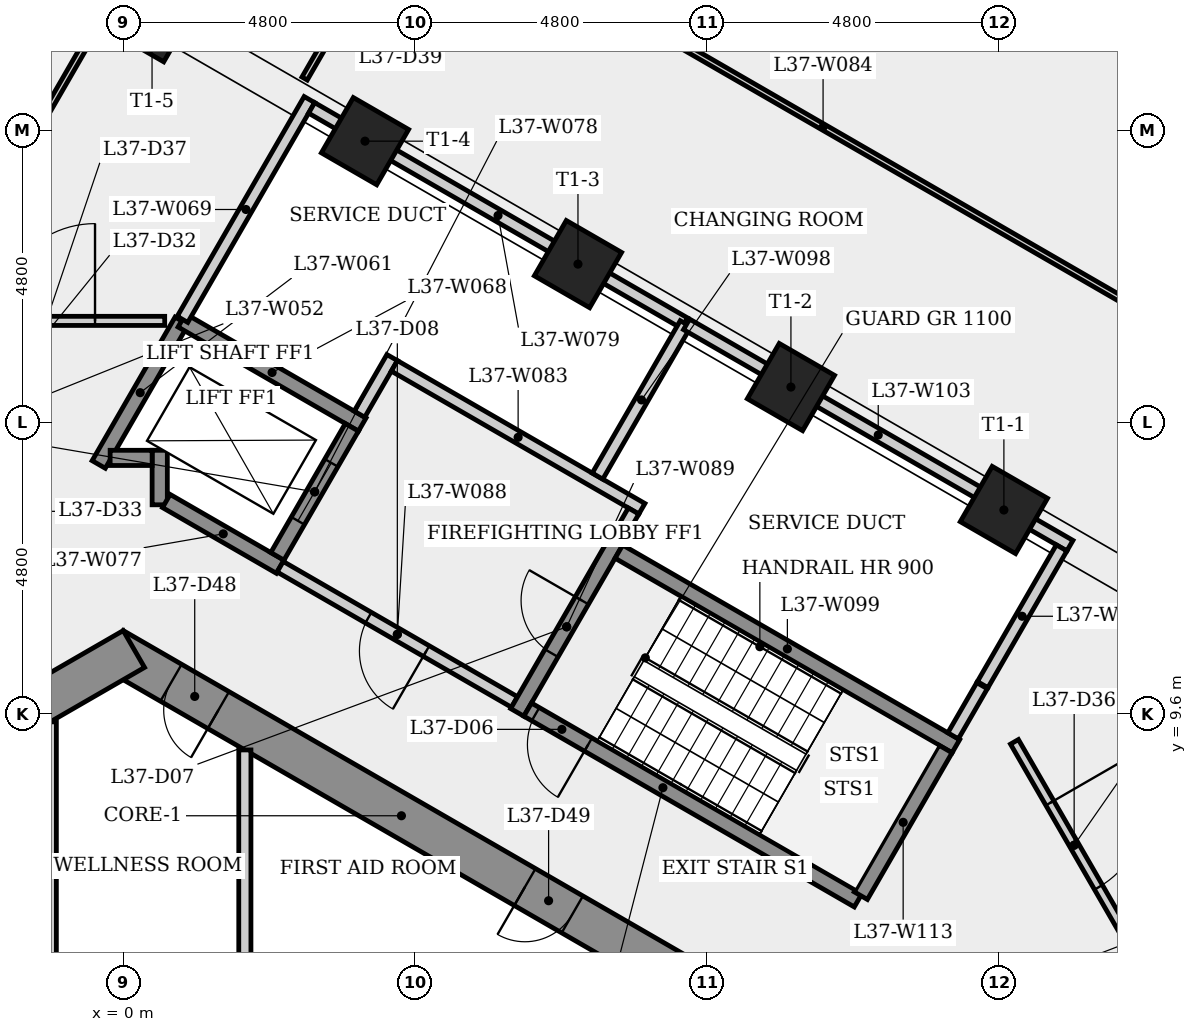
"""IFC4 building model, lengths in metres.
Left out: names, types, materials, properties, quantities, classifications, styles, units other than length and angle.
Written with IfcOpenShell. Run it as: python <this file> out.ifc"""

import sys

from ifc_helpers import new_model, si_unit, direction, frame, frame_2d, origin, origin_2d, place, context, subcontext, project, spatial, rectangle, extrude, element, fill, save


model = new_model("IFC4")
c1 = context("Model", 3, precision=1e-05, world=origin(), true_north=direction((0.0, 1.0)))
c2 = subcontext(c1, "Body", "Model", "MODEL_VIEW")
j1 = project(units=[si_unit("LENGTHUNIT", "METRE"), si_unit("PLANEANGLEUNIT", "RADIAN")], contexts=[c1])
p1 = place(None, origin())
s1 = spatial("IfcSite", under=j1, at=p1, CompositionType="ELEMENT")
p2 = place(p1, origin())
s2 = spatial("IfcBuilding", under=s1, at=p2, CompositionType="ELEMENT")
p3 = place(p2, frame((0.0, 0.0, 139.9)))
s3 = spatial("IfcBuildingStorey", under=s2, at=p3, CompositionType="ELEMENT", Elevation=139.9)
p4 = place(p3, frame((9.325, 5.182, 0.0), z_axis=(0.0, 0.0, 1.0), x_axis=(-0.866023993627, 0.500002442456, 0.0)))
e1 = element("IfcWall", 1, at=p4, inside=s3, PredefinedType="SHEAR", context=c2, shape_type="SweptSolid", body=[
    extrude(rectangle(XDim=10.97, YDim=0.7, at=frame_2d((5.485, 0.0))), origin(), (0.0, 0.0, 1.0), 4.0),
])
p5 = place(p4, frame((8.96, 0.0, 0.0)))
e2 = element("IfcOpeningElement", 2, at=p5, cuts=e1, PredefinedType="OPENING", context=c2, shape_type="SweptSolid", body=[
    extrude(rectangle(XDim=0.9, YDim=2.1, at=frame_2d((0.45, 1.05))), frame((0.0, 0.36, 0.0), z_axis=(0.0, -1.0, 0.0), x_axis=(1.0, 0.0, 0.0)), (0.0, 0.0, 1.0), 0.72),
])
p6 = place(p4, frame((2.24, 0.0, 0.0)))
e3 = element("IfcOpeningElement", 3, at=p6, cuts=e1, PredefinedType="OPENING", context=c2, shape_type="SweptSolid", body=[
    extrude(rectangle(XDim=0.9, YDim=2.1, at=frame_2d((0.45, 1.05))), frame((0.0, 0.36, 0.0), z_axis=(0.0, -1.0, 0.0), x_axis=(1.0, 0.0, 0.0)), (0.0, 0.0, 1.0), 0.72),
])
p7 = place(p3, frame((0.175, 10.667, 0.0), z_axis=(0.0, 0.0, 1.0), x_axis=(-0.866023993627, -0.500002442456, 0.0)))
e4 = element("IfcWall", 4, at=p7, inside=s3, PredefinedType="SHEAR", context=c2, shape_type="SweptSolid", body=[
    extrude(rectangle(XDim=10.97, YDim=0.7, at=frame_2d((5.485, 0.0))), origin(), (0.0, 0.0, 1.0), 4.0),
])
p8 = place(p7, frame((7.368, 0.0, 0.0)))
e5 = element("IfcOpeningElement", 5, at=p8, cuts=e4, PredefinedType="OPENING", context=c2, shape_type="SweptSolid", body=[
    extrude(rectangle(XDim=0.9, YDim=2.1, at=frame_2d((0.45, 1.05))), frame((0.0, 0.36, 0.0), z_axis=(0.0, -1.0, 0.0), x_axis=(1.0, 0.0, 0.0)), (0.0, 0.0, 1.0), 0.72),
])
for number, where, z_axis, x_axis in (
    (6, (14.483, 12.953, 0.0), (0.0, 0.0, 1.0), (0.5, 0.866, 0.0)),
    (7, (10.981, 14.975, 0.0), (0.0, 0.0, 1.0), (0.5, 0.866, 0.0)),
    (8, (7.479, 16.997, 0.0), (0.0, 0.0, 1.0), (0.5, 0.866, 0.0)),
    (9, (3.976, 19.019, 0.0), (0.0, 0.0, 1.0), (0.5, 0.866, 0.0)),
    (10, (0.474, 21.042, 0.0), (0.0, 0.0, 1.0), (0.5, 0.866, 0.0)),
):
    element("IfcColumn", number, at=place(p3, frame(where, z_axis=z_axis, x_axis=x_axis)), inside=s3, PredefinedType="COLUMN", context=c2, shape_type="SweptSolid", body=[
        extrude(rectangle(XDim=1.05, YDim=1.05, at=origin_2d()), origin(), (0.0, 0.0, 1.0), 4.0),
    ])
p9 = place(p3, frame((-3.548, 16.063, 0.0), z_axis=(0.0, 0.0, 1.0), x_axis=(1.0, 0.0, 0.0)))
e11 = element("IfcWall", 11, at=p9, inside=s3, PredefinedType="PARTITIONING", context=c2, shape_type="SweptSolid", body=[
    extrude(rectangle(XDim=4.23, YDim=0.15, at=frame_2d((2.115, 0.0))), origin(), (0.0, 0.0, 1.0), 3.6),
])
p10 = place(p9, frame((1.484, 0.0, 0.0)))
e12 = element("IfcOpeningElement", 12, at=p10, cuts=e11, PredefinedType="OPENING", context=c2, shape_type="SweptSolid", body=[
    extrude(rectangle(XDim=1.6, YDim=2.1, at=frame_2d((0.8, 1.05))), frame((0.0, 0.085, 0.0), z_axis=(0.0, -1.0, 0.0), x_axis=(1.0, 0.0, 0.0)), (0.0, 0.0, 1.0), 0.17),
])
p11 = place(p3, frame((-3.207, 16.128, 0.0), z_axis=(0.0, 0.0, 1.0), x_axis=(0.499964049572, 0.866046158779, 0.0)))
e13 = element("IfcWall", 13, at=p11, inside=s3, PredefinedType="PARTITIONING", context=c2, shape_type="SweptSolid", body=[
    extrude(rectangle(XDim=5.773, YDim=0.1, at=frame_2d((2.887, 0.0))), origin(), (0.0, 0.0, 1.0), 3.6),
])
p12 = place(p11, frame((2.387, 0.0, 0.0)))
e14 = element("IfcOpeningElement", 14, at=p12, cuts=e13, PredefinedType="OPENING", context=c2, shape_type="SweptSolid", body=[
    extrude(rectangle(XDim=1.0, YDim=2.1, at=frame_2d((0.5, 1.05))), frame((0.0, 0.06, 0.0), z_axis=(0.0, -1.0, 0.0), x_axis=(1.0, 0.0, 0.0)), (0.0, 0.0, 1.0), 0.12),
])
p13 = place(p3, frame((-1.2, 9.469, 0.0), z_axis=(0.0, 0.0, 1.0), x_axis=(0.0, -1.0, 0.0)))
e15 = element("IfcWall", 15, at=p13, inside=s3, PredefinedType="PARTITIONING", context=c2, shape_type="SweptSolid", body=[
    extrude(rectangle(XDim=4.194, YDim=0.2, at=frame_2d((2.097, 0.0))), origin(), (0.0, 0.0, 1.0), 3.6),
])
p14 = place(p3, frame((-0.403, 13.702, 0.0), z_axis=(0.0, 0.0, 1.0), x_axis=(0.499942002849, 0.866058885866, 0.0)))
e16 = element("IfcWall", 16, at=p14, inside=s3, PredefinedType="SHEAR", context=c2, shape_type="SweptSolid", body=[
    extrude(rectangle(XDim=2.727, YDim=0.25, at=frame_2d((1.364, 0.0))), origin(), (0.0, 0.0, 1.0), 3.6),
])
p15 = place(p3, frame((0.6, 13.039, 0.0), z_axis=(0.0, 0.0, 1.0), x_axis=(0.0, 1.0, 0.0)))
e17 = element("IfcWall", 17, at=p15, inside=s3, PredefinedType="SHEAR", context=c2, shape_type="SweptSolid", body=[
    extrude(rectangle(XDim=0.896, YDim=0.25, at=frame_2d((0.448, 0.0))), origin(), (0.0, 0.0, 1.0), 3.6),
])
p16 = place(p3, frame((0.475, 13.81, 0.0), z_axis=(0.0, 0.0, 1.0), x_axis=(-1.0, 0.0, 0.0)))
e18 = element("IfcWall", 18, at=p16, inside=s3, PredefinedType="SHEAR", context=c2, shape_type="SweptSolid", body=[
    extrude(rectangle(XDim=0.691, YDim=0.25, at=frame_2d((0.345, 0.0))), origin(), (0.0, 0.0, 1.0), 4.0),
])
p17 = place(p3, frame((0.965, 16.071, 0.0), z_axis=(0.0, 0.0, 1.0), x_axis=(0.866050272892, -0.499956922968, 0.0)))
e19 = element("IfcWall", 19, at=p17, inside=s3, PredefinedType="SHEAR", context=c2, shape_type="SweptSolid", body=[
    extrude(rectangle(XDim=3.425, YDim=0.25, at=frame_2d((1.712, 0.0))), origin(), (0.0, 0.0, 1.0), 3.6),
])
p18 = place(p3, frame((0.975, 16.088, 0.0), z_axis=(0.0, 0.0, 1.0), x_axis=(0.500032984372, 0.866006359411, 0.0)))
e20 = element("IfcWall", 20, at=p18, inside=s3, PredefinedType="PLUMBINGWALL", context=c2, shape_type="SweptSolid", body=[
    extrude(rectangle(XDim=4.174, YDim=0.2, at=frame_2d((2.087, 0.0))), origin(), (0.0, 0.0, 1.0), 3.6),
])
p19 = place(p3, frame((2.0, 9.007, 0.0), z_axis=(0.0, 0.0, 1.0), x_axis=(0.0, -1.0, 0.0)))
e21 = element("IfcWall", 21, at=p19, inside=s3, PredefinedType="PARTITIONING", context=c2, shape_type="SweptSolid", body=[
    extrude(rectangle(XDim=3.732, YDim=0.2, at=frame_2d((1.866, 0.0))), origin(), (0.0, 0.0, 1.0), 3.6),
])
p20 = place(p3, frame((2.581, 12.02, 0.0), z_axis=(0.0, 0.0, 1.0), x_axis=(-0.86603892542, 0.499976579108, 0.0)))
e22 = element("IfcWall", 22, at=p20, inside=s3, PredefinedType="SHEAR", context=c2, shape_type="SweptSolid", body=[
    extrude(rectangle(XDim=2.162, YDim=0.25, at=frame_2d((1.081, 0.0))), origin(), (0.0, 0.0, 1.0), 3.6),
])
p21 = place(p3, frame((2.535, 12.191, 0.0), z_axis=(0.0, 0.0, 1.0), x_axis=(0.500061746146, 0.865989751695, 0.0)))
e23 = element("IfcWall", 23, at=p21, inside=s3, PredefinedType="SHEAR", context=c2, shape_type="SweptSolid", body=[
    extrude(rectangle(XDim=2.45, YDim=0.25, at=frame_2d((1.225, 0.0))), origin(), (0.0, 0.0, 1.0), 4.0),
])
p22 = place(p21, frame((0.675, 0.0, 0.0)))
e24 = element("IfcOpeningElement", 24, at=p22, cuts=e23, PredefinedType="OPENING", context=c2, shape_type="SweptSolid", body=[
    extrude(rectangle(XDim=1.1, YDim=2.1, at=frame_2d((0.55, 1.05))), frame((0.0, 0.135, 0.0), z_axis=(0.0, -1.0, 0.0), x_axis=(1.0, 0.0, 0.0)), (0.0, 0.0, 1.0), 0.27),
])
p23 = place(p3, frame((3.098, 19.566, 0.0), z_axis=(0.0, 0.0, 1.0), x_axis=(0.866019052629, -0.500011000363, 0.0)))
e25 = element("IfcWall", 25, at=p23, inside=s3, PredefinedType="PLUMBINGWALL", context=c2, shape_type="SweptSolid", body=[
    extrude(rectangle(XDim=7.08, YDim=0.2, at=frame_2d((3.54, 0.0))), origin(), (0.0, 0.0, 1.0), 2.725),
])
p24 = place(p3, frame((3.885, 14.529, 0.0), z_axis=(0.0, 0.0, 1.0), x_axis=(0.499997628298, 0.866026773083, 0.0)))
e26 = element("IfcWall", 26, at=p24, inside=s3, PredefinedType="PLUMBINGWALL", context=c2, shape_type="SweptSolid", body=[
    extrude(rectangle(XDim=1.075, YDim=0.2, at=frame_2d((0.538, 0.0))), origin(), (0.0, 0.0, 1.0), 3.6),
])
p25 = place(p3, frame((4.459, 15.323, 0.0), z_axis=(0.0, 0.0, 1.0), x_axis=(0.866016039709, -0.500016218704, 0.0)))
e27 = element("IfcWall", 27, at=p25, inside=s3, PredefinedType="PLUMBINGWALL", context=c2, shape_type="SweptSolid", body=[
    extrude(rectangle(XDim=4.7, YDim=0.2, at=frame_2d((2.35, 0.0))), origin(), (0.0, 0.0, 1.0), 3.6),
])
p26 = place(p3, frame((4.813, 23.119, 0.0), z_axis=(0.0, 0.0, 1.0), x_axis=(0.86602732511, -0.499996672152, 0.0)))
e28 = element("IfcWall", 28, at=p26, inside=s3, PredefinedType="PARTITIONING", context=c2, shape_type="SweptSolid", body=[
    extrude(rectangle(XDim=15.465, YDim=0.1, at=frame_2d((7.732, 0.0))), origin(), (0.0, 0.0, 1.0), 3.6),
])
p27 = place(p3, frame((2.983, 20.049, 0.0), z_axis=(0.0, 0.0, 1.0), x_axis=(0.499998345156, 0.866026359207, 0.0)))
e29 = element("IfcWall", 29, at=p27, inside=s3, PredefinedType="PARTITIONING", context=c2, shape_type="SweptSolid", body=[
    extrude(rectangle(XDim=15.805, YDim=0.1, at=frame_2d((7.903, 0.0))), origin(), (0.0, 0.0, 1.0), 3.6),
])
p28 = place(p27, frame((1.322, 0.0, 0.0)))
e30 = element("IfcOpeningElement", 30, at=p28, cuts=e29, PredefinedType="OPENING", context=c2, shape_type="SweptSolid", body=[
    extrude(rectangle(XDim=0.9, YDim=2.1, at=frame_2d((0.45, 1.05))), frame((0.0, 0.06, 0.0), z_axis=(0.0, -1.0, 0.0), x_axis=(1.0, 0.0, 0.0)), (0.0, 0.0, 1.0), 0.12),
])
p29 = place(p27, frame((8.325, 0.0, 0.0)))
e31 = element("IfcOpeningElement", 31, at=p29, cuts=e29, PredefinedType="OPENING", context=c2, shape_type="SweptSolid", body=[
    extrude(rectangle(XDim=1.6, YDim=2.1, at=frame_2d((0.8, 1.05))), frame((0.0, 0.06, 0.0), z_axis=(0.0, -1.0, 0.0), x_axis=(1.0, 0.0, 0.0)), (0.0, 0.0, 1.0), 0.12),
])
p30 = place(p3, frame((6.435, 9.795, 0.0), z_axis=(0.0, 0.0, 1.0), x_axis=(-0.866012907634, 0.500021643343, 0.0)))
e32 = element("IfcWall", 32, at=p30, inside=s3, PredefinedType="PARTITIONING", context=c2, shape_type="SweptSolid", body=[
    extrude(rectangle(XDim=4.45, YDim=0.2, at=frame_2d((2.225, 0.0))), origin(), (0.0, 0.0, 1.0), 3.6),
])
p31 = place(p30, frame((1.675, 0.0, 0.0)))
e33 = element("IfcOpeningElement", 33, at=p31, cuts=e32, PredefinedType="OPENING", context=c2, shape_type="SweptSolid", body=[
    extrude(rectangle(XDim=1.1, YDim=2.1, at=frame_2d((0.55, 1.05))), frame((0.0, 0.11, 0.0), z_axis=(0.0, -1.0, 0.0), x_axis=(1.0, 0.0, 0.0)), (0.0, 0.0, 1.0), 0.22),
])
p32 = place(p3, frame((6.48, 9.624, 0.0), z_axis=(0.0, 0.0, 1.0), x_axis=(0.500017246033, 0.866015446554, 0.0)))
e34 = element("IfcWall", 34, at=p32, inside=s3, PredefinedType="SHEAR", context=c2, shape_type="SweptSolid", body=[
    extrude(rectangle(XDim=3.25, YDim=0.25, at=frame_2d((1.625, 0.0))), origin(), (0.0, 0.0, 1.0), 3.6),
])
p33 = place(p32, frame((1.125, 0.0, 0.0)))
e35 = element("IfcOpeningElement", 35, at=p33, cuts=e34, PredefinedType="OPENING", context=c2, shape_type="SweptSolid", body=[
    extrude(rectangle(XDim=1.0, YDim=2.1, at=frame_2d((0.5, 1.05))), frame((0.0, 0.135, 0.0), z_axis=(0.0, -1.0, 0.0), x_axis=(1.0, 0.0, 0.0)), (0.0, 0.0, 1.0), 0.27),
])
p34 = place(p3, frame((6.6, 26.214, 0.0), z_axis=(0.0, 0.0, 1.0), x_axis=(0.86602732511, -0.499996672152, 0.0)))
e36 = element("IfcWall", 36, at=p34, inside=s3, PredefinedType="PARTITIONING", context=c2, shape_type="SweptSolid", body=[
    extrude(rectangle(XDim=15.465, YDim=0.1, at=frame_2d((7.732, 0.0))), origin(), (0.0, 0.0, 1.0), 3.6),
])
p35 = place(p3, frame((7.8, 13.51, 0.0), z_axis=(0.0, 0.0, 1.0), x_axis=(0.499995073634, 0.866028248005, 0.0)))
e37 = element("IfcWall", 37, at=p35, inside=s3, PredefinedType="PLUMBINGWALL", context=c2, shape_type="SweptSolid", body=[
    extrude(rectangle(XDim=2.894, YDim=0.2, at=frame_2d((1.447, 0.0))), origin(), (0.0, 0.0, 1.0), 3.6),
])
p36 = place(p3, frame((8.151, 12.268, 0.0), z_axis=(0.0, 0.0, 1.0), x_axis=(0.866025499775, -0.499999833739, 0.0)))
e38 = element("IfcWall", 38, at=p36, inside=s3, PredefinedType="SHEAR", context=c2, shape_type="SweptSolid", body=[
    extrude(rectangle(XDim=6.4, YDim=0.25, at=frame_2d((3.2, 0.0))), origin(), (0.0, 0.0, 1.0), 3.6),
])
p37 = place(p3, frame((8.393, 12.937, 0.0), z_axis=(0.0, 0.0, 1.0), x_axis=(-0.500065409566, -0.86598763626, 0.0)))
e39 = element("IfcWall", 39, at=p37, inside=s3, PredefinedType="PLUMBINGWALL", context=c2, shape_type="SweptSolid", body=[
    extrude(rectangle(XDim=0.575, YDim=0.2, at=frame_2d((0.288, 0.0))), origin(), (0.0, 0.0, 1.0), 3.6),
])
p38 = place(p3, frame((9.264, 16.006, 0.0), z_axis=(0.0, 0.0, 1.0), x_axis=(0.866032567898, -0.499987591186, 0.0)))
e40 = element("IfcWall", 40, at=p38, inside=s3, PredefinedType="PLUMBINGWALL", context=c2, shape_type="SweptSolid", body=[
    extrude(rectangle(XDim=7.28, YDim=0.2, at=frame_2d((3.64, 0.0))), origin(), (0.0, 0.0, 1.0), 2.725),
])
p39 = place(p3, frame((11.1, 7.101, 0.0), z_axis=(0.0, 0.0, 1.0), x_axis=(-0.8660265141, 0.499998076872, 0.0)))
e41 = element("IfcWall", 41, at=p39, inside=s3, PredefinedType="SHEAR", context=c2, shape_type="SweptSolid", body=[
    extrude(rectangle(XDim=5.137, YDim=0.25, at=frame_2d((2.569, 0.0))), origin(), (0.0, 0.0, 1.0), 3.6),
])
p40 = place(p39, frame((3.987, 0.0, 0.0)))
e42 = element("IfcOpeningElement", 42, at=p40, cuts=e41, PredefinedType="OPENING", context=c2, shape_type="SweptSolid", body=[
    extrude(rectangle(XDim=1.0, YDim=2.1, at=frame_2d((0.5, 1.05))), frame((0.0, 0.135, 0.0), z_axis=(0.0, -1.0, 0.0), x_axis=(1.0, 0.0, 0.0)), (0.0, 0.0, 1.0), 0.27),
])
p41 = place(p3, frame((12.085, 6.532, 0.0), z_axis=(0.0, 0.0, 1.0), x_axis=(-0.86604373436, 0.499968249168, 0.0)))
e43 = element("IfcWall", 43, at=p41, inside=s3, PredefinedType="SHEAR", context=c2, shape_type="SweptSolid", body=[
    extrude(rectangle(XDim=1.118, YDim=0.25, at=frame_2d((0.559, 0.0))), origin(), (0.0, 0.0, 1.0), 3.6),
])
p42 = place(p3, frame((13.523, 9.022, 0.0), z_axis=(0.0, 0.0, 1.0), x_axis=(-0.500013277472, -0.866017737897, 0.0)))
e44 = element("IfcWall", 44, at=p42, inside=s3, PredefinedType="SHEAR", context=c2, shape_type="SweptSolid", body=[
    extrude(rectangle(XDim=2.786, YDim=0.25, at=frame_2d((1.393, 0.0))), origin(), (0.0, 0.0, 1.0), 3.6),
])
p43 = place(p3, frame((14.124, 10.064, 0.0), z_axis=(0.0, 0.0, 1.0), x_axis=(-0.4998334002, -0.86612156886, 0.0)))
e45 = element("IfcWall", 45, at=p43, inside=s3, PredefinedType="PLUMBINGWALL", context=c2, shape_type="SweptSolid", body=[
    extrude(rectangle(XDim=0.952, YDim=0.2, at=frame_2d((0.476, 0.0))), origin(), (0.0, 0.0, 1.0), 3.6),
])
p44 = place(p3, frame((14.657, 9.14, 0.0), z_axis=(0.0, 0.0, 1.0), x_axis=(0.500011323479, -0.866018866072, 0.0)))
e46 = element("IfcWall", 46, at=p44, inside=s3, PredefinedType="PARTITIONING", context=c2, shape_type="SweptSolid", body=[
    extrude(rectangle(XDim=3.926, YDim=0.15, at=frame_2d((1.963, 0.0))), origin(), (0.0, 0.0, 1.0), 3.6),
])
p45 = place(p44, frame((1.163, 0.0, 0.0)))
e47 = element("IfcOpeningElement", 47, at=p45, cuts=e46, PredefinedType="OPENING", context=c2, shape_type="SweptSolid", body=[
    extrude(rectangle(XDim=1.6, YDim=2.1, at=frame_2d((0.8, 1.05))), frame((0.0, 0.085, 0.0), z_axis=(0.0, -1.0, 0.0), x_axis=(1.0, 0.0, 0.0)), (0.0, 0.0, 1.0), 0.17),
])
p46 = place(p3, frame((15.432, 12.33, 0.0), z_axis=(0.0, 0.0, 1.0), x_axis=(-0.499961171201, -0.866047820441, 0.0)))
e48 = element("IfcWall", 48, at=p46, inside=s3, PredefinedType="PLUMBINGWALL", context=c2, shape_type="SweptSolid", body=[
    extrude(rectangle(XDim=2.597, YDim=0.2, at=frame_2d((1.298, 0.0))), origin(), (0.0, 0.0, 1.0), 3.6),
])
p47 = place(p40, origin())
e49 = element("IfcDoor", 49, at=p47, inside=s3, OperationType="SINGLE_SWING_LEFT", PredefinedType="DOOR", context=c2, shape_type="SweptSolid", body=[
    extrude(rectangle(XDim=1.0, YDim=2.1, at=frame_2d((0.5, 1.05))), frame((0.0, 0.025, 0.0), z_axis=(0.0, -1.0, 0.0), x_axis=(1.0, 0.0, 0.0)), (0.0, 0.0, 1.0), 0.05),
])
fill(e42, e49)
p48 = place(p33, origin())
e50 = element("IfcDoor", 50, at=p48, inside=s3, OperationType="SINGLE_SWING_RIGHT", PredefinedType="DOOR", context=c2, shape_type="SweptSolid", body=[
    extrude(rectangle(XDim=1.0, YDim=2.1, at=frame_2d((0.5, 1.05))), frame((0.0, 0.025, 0.0), z_axis=(0.0, -1.0, 0.0), x_axis=(1.0, 0.0, 0.0)), (0.0, 0.0, 1.0), 0.05),
])
fill(e35, e50)
p49 = place(p31, origin())
e51 = element("IfcDoor", 51, at=p49, inside=s3, OperationType="SINGLE_SWING_LEFT", PredefinedType="DOOR", context=c2, shape_type="SweptSolid", body=[
    extrude(rectangle(XDim=1.1, YDim=2.1, at=frame_2d((0.55, 1.05))), frame((0.0, 0.025, 0.0), z_axis=(0.0, -1.0, 0.0), x_axis=(1.0, 0.0, 0.0)), (0.0, 0.0, 1.0), 0.05),
])
fill(e33, e51)
p50 = place(p22, origin())
e52 = element("IfcDoor", 52, at=p50, inside=s3, OperationType="SLIDING_TO_LEFT", PredefinedType="DOOR", context=c2, shape_type="SweptSolid", body=[
    extrude(rectangle(XDim=1.1, YDim=2.1, at=frame_2d((0.55, 1.05))), frame((0.0, 0.025, 0.0), z_axis=(0.0, -1.0, 0.0), x_axis=(1.0, 0.0, 0.0)), (0.0, 0.0, 1.0), 0.05),
])
fill(e24, e52)
p51 = place(p45, origin())
e53 = element("IfcDoor", 53, at=p51, inside=s3, OperationType="SINGLE_SWING_LEFT", PredefinedType="DOOR", context=c2, shape_type="SweptSolid", body=[
    extrude(rectangle(XDim=1.6, YDim=2.1, at=frame_2d((0.8, 1.05))), frame((0.0, 0.025, 0.0), z_axis=(0.0, -1.0, 0.0), x_axis=(1.0, 0.0, 0.0)), (0.0, 0.0, 1.0), 0.05),
])
fill(e47, e53)
p52 = place(p10, origin())
e54 = element("IfcDoor", 54, at=p52, inside=s3, OperationType="SINGLE_SWING_RIGHT", PredefinedType="DOOR", context=c2, shape_type="SweptSolid", body=[
    extrude(rectangle(XDim=1.6, YDim=2.1, at=frame_2d((0.8, 1.05))), frame((0.0, 0.025, 0.0), z_axis=(0.0, -1.0, 0.0), x_axis=(1.0, 0.0, 0.0)), (0.0, 0.0, 1.0), 0.05),
])
fill(e12, e54)
p53 = place(p5, origin())
e55 = element("IfcDoor", 55, at=p53, inside=s3, OperationType="SINGLE_SWING_LEFT", PredefinedType="DOOR", context=c2, shape_type="SweptSolid", body=[
    extrude(rectangle(XDim=0.9, YDim=2.1, at=frame_2d((0.45, 1.05))), frame((0.0, 0.025, 0.0), z_axis=(0.0, -1.0, 0.0), x_axis=(1.0, 0.0, 0.0)), (0.0, 0.0, 1.0), 0.05),
])
fill(e2, e55)
p54 = place(p6, origin())
e56 = element("IfcDoor", 56, at=p54, inside=s3, OperationType="SINGLE_SWING_RIGHT", PredefinedType="DOOR", context=c2, shape_type="SweptSolid", body=[
    extrude(rectangle(XDim=0.9, YDim=2.1, at=frame_2d((0.45, 1.05))), frame((0.0, 0.025, 0.0), z_axis=(0.0, -1.0, 0.0), x_axis=(1.0, 0.0, 0.0)), (0.0, 0.0, 1.0), 0.05),
])
fill(e3, e56)
save(model, sys.argv[1])
